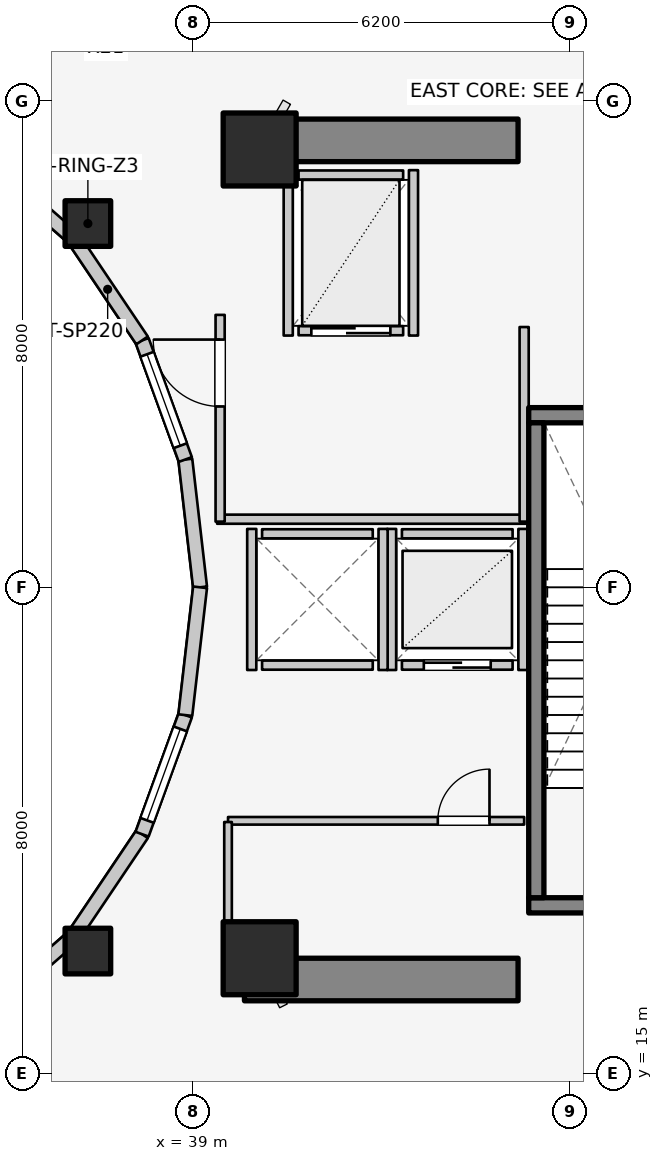
"""IFC4 building model, lengths in metres.
Left out: names, types, materials, properties, quantities, classifications, styles, units other than length and angle.
Written with IfcOpenShell. Run it as: python <this file> out.ifc"""

import sys

from ifc_helpers import new_model, si_unit, direction, frame, frame_2d, origin, origin_2d, place, context, subcontext, project, spatial, rectangle, extrude, element, fill, save


model = new_model("IFC4")
c1 = context("Model", 3, precision=1e-05, world=origin(), true_north=direction((0.0, 1.0)))
c2 = subcontext(c1, "Body", "Model", "MODEL_VIEW")
j1 = project(units=[si_unit("LENGTHUNIT", "METRE"), si_unit("PLANEANGLEUNIT", "RADIAN")], contexts=[c1])
p1 = place(None, origin())
s1 = spatial("IfcSite", under=j1, at=p1, CompositionType="ELEMENT")
p2 = place(p1, origin())
s2 = spatial("IfcBuilding", under=s1, at=p2, CompositionType="ELEMENT")
p3 = place(p2, frame((0.0, 0.0, 129.0)))
s3 = spatial("IfcBuildingStorey", under=s2, at=p3, CompositionType="ELEMENT", Elevation=129.0)
for number, where, z_axis, x_axis in (
    (1, (39.85, 16.55, 0.0), (0.0, 0.0, 1.0), (1.0, 0.0, 0.0)),
    (2, (39.85, 30.35, 0.0), (0.0, 0.0, 1.0), (1.0, 0.0, 0.0)),
):
    element("IfcWall", number, at=place(p3, frame(where, z_axis=z_axis, x_axis=x_axis)), inside=s3, PredefinedType="SHEAR", context=c2, shape_type="SweptSolid", body=[
        extrude(rectangle(XDim=4.5, YDim=0.7, at=frame_2d((2.25, 0.0))), origin(), (0.0, 0.0, 1.0), 4.2),
    ])
p4 = place(p3, frame((44.525, 17.77, 0.0), z_axis=(0.0, 0.0, 1.0), x_axis=(1.0, 0.0, 0.0)))
e3 = element("IfcWall", 3, at=p4, inside=s3, PredefinedType="SOLIDWALL", context=c2, shape_type="SweptSolid", body=[
    extrude(rectangle(XDim=3.37, YDim=0.25, at=frame_2d((1.685, 0.0))), origin(), (0.0, 0.0, 1.0), 4.2),
])
p5 = place(p4, frame((1.135, 0.0, 0.0)))
e4 = element("IfcOpeningElement", 4, at=p5, cuts=e3, PredefinedType="OPENING", context=c2, shape_type="SweptSolid", body=[
    extrude(rectangle(XDim=1.1, YDim=2.1, at=frame_2d((0.55, 1.05))), frame((0.0, 0.135, 0.0), z_axis=(0.0, -1.0, 0.0), x_axis=(1.0, 0.0, 0.0)), (0.0, 0.0, 1.0), 0.27),
])
p6 = place(p3, frame((44.525, 25.83, 0.0), z_axis=(0.0, 0.0, 1.0), x_axis=(1.0, 0.0, 0.0)))
e5 = element("IfcWall", 5, at=p6, inside=s3, PredefinedType="SOLIDWALL", context=c2, shape_type="SweptSolid", body=[
    extrude(rectangle(XDim=3.37, YDim=0.25, at=frame_2d((1.685, 0.0))), origin(), (0.0, 0.0, 1.0), 4.2),
])
p7 = place(p3, frame((44.65, 17.895, 0.0), z_axis=(0.0, 0.0, 1.0), x_axis=(0.0, 1.0, 0.0)))
e6 = element("IfcWall", 6, at=p7, inside=s3, PredefinedType="SOLIDWALL", context=c2, shape_type="SweptSolid", body=[
    extrude(rectangle(XDim=7.81, YDim=0.25, at=frame_2d((3.905, 0.0))), origin(), (0.0, 0.0, 1.0), 4.2),
])
for number, where, z_axis, x_axis in (
    (7, (40.1, 16.9, 0.0), (0.0, 0.0, 1.0), (1.0, 0.0, 0.0)),
    (8, (40.1, 30.2, 0.0), (0.0, 0.0, 1.0), (1.0, 0.0, 0.0)),
):
    element("IfcColumn", number, at=place(p3, frame(where, z_axis=z_axis, x_axis=x_axis)), inside=s3, PredefinedType="COLUMN", context=c2, shape_type="SweptSolid", body=[
        extrude(rectangle(XDim=1.2, YDim=1.2, at=origin_2d()), origin(), (0.0, 0.0, 1.0), 4.2),
    ])
for number, where, z_axis, x_axis in (
    (9, (37.275, 28.982, 0.0), (0.0, 0.0, 1.0), (1.0, 0.0, 0.0)),
    (10, (37.275, 17.018, 0.0), (0.0, 0.0, 1.0), (1.0, 0.0, 0.0)),
):
    element("IfcColumn", number, at=place(p3, frame(where, z_axis=z_axis, x_axis=x_axis)), inside=s3, PredefinedType="COLUMN", context=c2, shape_type="SweptSolid", body=[
        extrude(rectangle(XDim=0.75, YDim=0.75, at=origin_2d()), origin(), (0.0, 0.0, 1.0), 4.2),
    ])
p8 = place(p3, frame((39.12, 23.0, 0.0), z_axis=(0.0, 0.0, 1.0), x_axis=(-0.114711713601, 0.993398823617, 0.0)))
e11 = element("IfcWall", 11, at=p8, inside=s3, PredefinedType="STANDARD", context=c2, shape_type="SweptSolid", body=[
    extrude(rectangle(XDim=2.115, YDim=0.23, at=frame_2d((1.058, 0.0))), origin(), (0.0, 0.0, 1.0), 2.8),
])
p9 = place(p3, frame((38.877, 25.102, 0.0), z_axis=(0.0, 0.0, 1.0), x_axis=(-0.341423187295, 0.93990968033, 0.0)))
e12 = element("IfcWall", 12, at=p9, inside=s3, PredefinedType="STANDARD", context=c2, shape_type="SweptSolid", body=[
    extrude(rectangle(XDim=2.084, YDim=0.23, at=frame_2d((1.042, 0.0))), origin(), (0.0, 0.0, 1.0), 2.8),
])
p10 = place(p9, frame((0.242, 0.0, 0.85)))
e13 = element("IfcOpeningElement", 13, at=p10, cuts=e12, PredefinedType="OPENING", context=c2, shape_type="SweptSolid", body=[
    extrude(rectangle(XDim=1.6, YDim=1.65, at=frame_2d((0.8, 0.825))), frame((0.0, 0.125, 0.0), z_axis=(0.0, -1.0, 0.0), x_axis=(1.0, 0.0, 0.0)), (0.0, 0.0, 1.0), 0.25),
])
p11 = place(p3, frame((38.166, 27.06, 0.0), z_axis=(0.0, 0.0, 1.0), x_axis=(-0.558197800898, 0.829707909492, 0.0)))
e14 = element("IfcWall", 14, at=p11, inside=s3, PredefinedType="STANDARD", context=c2, shape_type="SweptSolid", body=[
    extrude(rectangle(XDim=2.027, YDim=0.23, at=frame_2d((1.013, 0.0))), origin(), (0.0, 0.0, 1.0), 2.32),
])
for number, where, z_axis, x_axis in (
    (15, (37.035, 28.742, 0.0), (0.0, 0.0, 1.0), (-0.753, 0.659, 0.0)),
    (16, (35.56, 15.968, 0.0), (0.0, 0.0, 1.0), (0.753, 0.659, 0.0)),
):
    element("IfcWall", number, at=place(p3, frame(where, z_axis=z_axis, x_axis=x_axis)), inside=s3, PredefinedType="STANDARD", context=c2, shape_type="SweptSolid", body=[
        extrude(rectangle(XDim=1.959, YDim=0.23, at=frame_2d((0.98, 0.0))), origin(), (0.0, 0.0, 1.0), 2.32),
    ])
p12 = place(p3, frame((37.035, 17.258, 0.0), z_axis=(0.0, 0.0, 1.0), x_axis=(0.558197800898, 0.829707909492, 0.0)))
e17 = element("IfcWall", 17, at=p12, inside=s3, PredefinedType="STANDARD", context=c2, shape_type="SweptSolid", body=[
    extrude(rectangle(XDim=2.027, YDim=0.23, at=frame_2d((1.013, 0.0))), origin(), (0.0, 0.0, 1.0), 2.32),
])
p13 = place(p3, frame((38.166, 18.94, 0.0), z_axis=(0.0, 0.0, 1.0), x_axis=(0.341423187295, 0.93990968033, 0.0)))
e18 = element("IfcWall", 18, at=p13, inside=s3, PredefinedType="STANDARD", context=c2, shape_type="SweptSolid", body=[
    extrude(rectangle(XDim=2.084, YDim=0.23, at=frame_2d((1.042, 0.0))), origin(), (0.0, 0.0, 1.0), 2.8),
])
p14 = place(p13, frame((0.242, 0.0, 0.85)))
e19 = element("IfcOpeningElement", 19, at=p14, cuts=e18, PredefinedType="OPENING", context=c2, shape_type="SweptSolid", body=[
    extrude(rectangle(XDim=1.6, YDim=1.65, at=frame_2d((0.8, 0.825))), frame((0.0, 0.125, 0.0), z_axis=(0.0, -1.0, 0.0), x_axis=(1.0, 0.0, 0.0)), (0.0, 0.0, 1.0), 0.25),
])
p15 = place(p3, frame((38.877, 20.898, 0.0), z_axis=(0.0, 0.0, 1.0), x_axis=(0.114711713601, 0.993398823617, 0.0)))
e20 = element("IfcWall", 20, at=p15, inside=s3, PredefinedType="STANDARD", context=c2, shape_type="SweptSolid", body=[
    extrude(rectangle(XDim=2.115, YDim=0.23, at=frame_2d((1.058, 0.0))), origin(), (0.0, 0.0, 1.0), 2.8),
])
p16 = place(p3, frame((42.44, 21.72, 0.0), z_axis=(0.0, 0.0, 1.0), x_axis=(1.0, 0.0, 0.0)))
e21 = element("IfcWall", 21, at=p16, inside=s3, PredefinedType="SOLIDWALL", context=c2, shape_type="SweptSolid", body=[
    extrude(rectangle(XDim=1.82, YDim=0.15, at=frame_2d((0.91, 0.0))), origin(), (0.0, 0.0, 1.0), 3.675),
])
p17 = place(p16, frame((0.36, 0.0, 0.0)))
e22 = element("IfcOpeningElement", 22, at=p17, cuts=e21, PredefinedType="OPENING", context=c2, shape_type="SweptSolid", body=[
    extrude(rectangle(XDim=1.1, YDim=2.1, at=frame_2d((0.55, 1.05))), frame((0.0, 0.085, 0.0), z_axis=(0.0, -1.0, 0.0), x_axis=(1.0, 0.0, 0.0)), (0.0, 0.0, 1.0), 0.17),
])
p18 = place(p3, frame((42.44, 23.88, 0.0), z_axis=(0.0, 0.0, 1.0), x_axis=(1.0, 0.0, 0.0)))
e23 = element("IfcWall", 23, at=p18, inside=s3, PredefinedType="SOLIDWALL", context=c2, shape_type="SweptSolid", body=[
    extrude(rectangle(XDim=1.82, YDim=0.15, at=frame_2d((0.91, 0.0))), origin(), (0.0, 0.0, 1.0), 3.675),
])
for number, where, z_axis, x_axis in (
    (24, (42.27, 21.64, 0.0), (0.0, 0.0, 1.0), (0.0, 1.0, 0.0)),
    (25, (44.43, 21.64, 0.0), (0.0, 0.0, 1.0), (0.0, 1.0, 0.0)),
):
    element("IfcWall", number, at=place(p3, frame(where, z_axis=z_axis, x_axis=x_axis)), inside=s3, PredefinedType="SOLIDWALL", context=c2, shape_type="SweptSolid", body=[
        extrude(rectangle(XDim=2.32, YDim=0.15, at=frame_2d((1.16, 0.0))), origin(), (0.0, 0.0, 1.0), 3.675),
    ])
for number, where, z_axis, x_axis in (
    (26, (40.14, 21.72, 0.0), (0.0, 0.0, 1.0), (1.0, 0.0, 0.0)),
    (27, (40.14, 23.88, 0.0), (0.0, 0.0, 1.0), (1.0, 0.0, 0.0)),
):
    element("IfcWall", number, at=place(p3, frame(where, z_axis=z_axis, x_axis=x_axis)), inside=s3, PredefinedType="SOLIDWALL", context=c2, shape_type="SweptSolid", body=[
        extrude(rectangle(XDim=1.82, YDim=0.15, at=frame_2d((0.91, 0.0))), origin(), (0.0, 0.0, 1.0), 3.22),
    ])
p19 = place(p3, frame((39.97, 21.64, 0.0), z_axis=(0.0, 0.0, 1.0), x_axis=(0.0, 1.0, 0.0)))
e28 = element("IfcWall", 28, at=p19, inside=s3, PredefinedType="SOLIDWALL", context=c2, shape_type="SweptSolid", body=[
    extrude(rectangle(XDim=2.32, YDim=0.15, at=frame_2d((1.16, 0.0))), origin(), (0.0, 0.0, 1.0), 3.22),
])
p20 = place(p3, frame((42.13, 21.64, 0.0), z_axis=(0.0, 0.0, 1.0), x_axis=(0.0, 1.0, 0.0)))
e29 = element("IfcWall", 29, at=p20, inside=s3, PredefinedType="SOLIDWALL", context=c2, shape_type="SweptSolid", body=[
    extrude(rectangle(XDim=2.32, YDim=0.15, at=frame_2d((1.16, 0.0))), origin(), (0.0, 0.0, 1.0), 3.675),
])
p21 = place(p3, frame((40.74, 27.22, 0.0), z_axis=(0.0, 0.0, 1.0), x_axis=(1.0, 0.0, 0.0)))
e30 = element("IfcWall", 30, at=p21, inside=s3, PredefinedType="SOLIDWALL", context=c2, shape_type="SweptSolid", body=[
    extrude(rectangle(XDim=1.72, YDim=0.15, at=frame_2d((0.86, 0.0))), origin(), (0.0, 0.0, 1.0), 3.675),
])
p22 = place(p21, frame((0.21, 0.0, 0.0)))
e31 = element("IfcOpeningElement", 31, at=p22, cuts=e30, PredefinedType="OPENING", context=c2, shape_type="SweptSolid", body=[
    extrude(rectangle(XDim=1.3, YDim=2.1, at=frame_2d((0.65, 1.05))), frame((0.0, 0.085, 0.0), z_axis=(0.0, -1.0, 0.0), x_axis=(1.0, 0.0, 0.0)), (0.0, 0.0, 1.0), 0.17),
])
p23 = place(p3, frame((40.74, 29.78, 0.0), z_axis=(0.0, 0.0, 1.0), x_axis=(1.0, 0.0, 0.0)))
e32 = element("IfcWall", 32, at=p23, inside=s3, PredefinedType="SOLIDWALL", context=c2, shape_type="SweptSolid", body=[
    extrude(rectangle(XDim=1.72, YDim=0.15, at=frame_2d((0.86, 0.0))), origin(), (0.0, 0.0, 1.0), 3.675),
])
for number, where, z_axis, x_axis in (
    (33, (40.57, 27.14, 0.0), (0.0, 0.0, 1.0), (0.0, 1.0, 0.0)),
    (34, (42.63, 27.14, 0.0), (0.0, 0.0, 1.0), (0.0, 1.0, 0.0)),
):
    element("IfcWall", number, at=place(p3, frame(where, z_axis=z_axis, x_axis=x_axis)), inside=s3, PredefinedType="SOLIDWALL", context=c2, shape_type="SweptSolid", body=[
        extrude(rectangle(XDim=2.72, YDim=0.15, at=frame_2d((1.36, 0.0))), origin(), (0.0, 0.0, 1.0), 3.675),
    ])
p24 = place(p3, frame((39.4, 24.12, 0.0), z_axis=(0.0, 0.0, 1.0), x_axis=(1.0, 0.0, 0.0)))
e35 = element("IfcWall", 35, at=p24, inside=s3, PredefinedType="PARTITIONING", context=c2, shape_type="SweptSolid", body=[
    extrude(rectangle(XDim=5.08, YDim=0.15, at=frame_2d((2.54, 0.0))), origin(), (0.0, 0.0, 1.0), 3.22),
])
p25 = place(p3, frame((44.45, 24.08, 0.0), z_axis=(0.0, 0.0, 1.0), x_axis=(0.0, 1.0, 0.0)))
e36 = element("IfcWall", 36, at=p25, inside=s3, PredefinedType="PARTITIONING", context=c2, shape_type="SweptSolid", body=[
    extrude(rectangle(XDim=3.2, YDim=0.15, at=frame_2d((1.6, 0.0))), origin(), (0.0, 0.0, 1.0), 3.675),
])
p26 = place(p3, frame((39.45, 24.08, 0.0), z_axis=(0.0, 0.0, 1.0), x_axis=(0.0, 1.0, 0.0)))
e37 = element("IfcWall", 37, at=p26, inside=s3, PredefinedType="PARTITIONING", context=c2, shape_type="SweptSolid", body=[
    extrude(rectangle(XDim=3.4, YDim=0.15, at=frame_2d((1.7, 0.0))), origin(), (0.0, 0.0, 1.0), 3.675),
])
p27 = place(p26, frame((1.894, 0.0, 0.0)))
e38 = element("IfcOpeningElement", 38, at=p27, cuts=e37, PredefinedType="OPENING", context=c2, shape_type="SweptSolid", body=[
    extrude(rectangle(XDim=1.1, YDim=2.1, at=frame_2d((0.55, 1.05))), frame((0.0, 0.085, 0.0), z_axis=(0.0, -1.0, 0.0), x_axis=(1.0, 0.0, 0.0)), (0.0, 0.0, 1.0), 0.17),
])
p28 = place(p3, frame((39.58, 19.16, 0.0), z_axis=(0.0, 0.0, 1.0), x_axis=(1.0, 0.0, 0.0)))
e39 = element("IfcWall", 39, at=p28, inside=s3, PredefinedType="PARTITIONING", context=c2, shape_type="SweptSolid", body=[
    extrude(rectangle(XDim=4.87, YDim=0.125, at=frame_2d((2.435, 0.0))), origin(), (0.0, 0.0, 1.0), 3.22),
])
p29 = place(p28, frame((3.45, 0.0, 0.0)))
e40 = element("IfcOpeningElement", 40, at=p29, cuts=e39, PredefinedType="OPENING", context=c2, shape_type="SweptSolid", body=[
    extrude(rectangle(XDim=0.85, YDim=2.05, at=frame_2d((0.425, 1.025))), frame((0.0, 0.073, 0.0), z_axis=(0.0, -1.0, 0.0), x_axis=(1.0, 0.0, 0.0)), (0.0, 0.0, 1.0), 0.145),
])
p30 = place(p3, frame((39.58, 17.1, 0.0), z_axis=(0.0, 0.0, 1.0), x_axis=(0.0, 1.0, 0.0)))
e41 = element("IfcWall", 41, at=p30, inside=s3, PredefinedType="PARTITIONING", context=c2, shape_type="SweptSolid", body=[
    extrude(rectangle(XDim=2.04, YDim=0.125, at=frame_2d((1.02, 0.0))), origin(), (0.0, 0.0, 1.0), 3.052),
])
p31 = place(p10, origin())
e42 = element("IfcWindow", 42, at=p31, inside=s3, PartitioningType="SINGLE_PANEL", PredefinedType="WINDOW", context=c2, shape_type="SweptSolid", body=[
    extrude(rectangle(XDim=1.6, YDim=1.65, at=frame_2d((0.8, 0.825))), frame((0.0, 0.03, 0.0), z_axis=(0.0, -1.0, 0.0), x_axis=(1.0, 0.0, 0.0)), (0.0, 0.0, 1.0), 0.06),
])
fill(e13, e42)
p32 = place(p14, origin())
e43 = element("IfcWindow", 43, at=p32, inside=s3, PartitioningType="SINGLE_PANEL", PredefinedType="WINDOW", context=c2, shape_type="SweptSolid", body=[
    extrude(rectangle(XDim=1.6, YDim=1.65, at=frame_2d((0.8, 0.825))), frame((0.0, 0.03, 0.0), z_axis=(0.0, -1.0, 0.0), x_axis=(1.0, 0.0, 0.0)), (0.0, 0.0, 1.0), 0.06),
])
fill(e19, e43)
p33 = place(p17, origin())
e44 = element("IfcDoor", 44, at=p33, inside=s3, OperationType="DOUBLE_DOOR_SLIDING", PredefinedType="DOOR", context=c2, shape_type="SweptSolid", body=[
    extrude(rectangle(XDim=1.1, YDim=2.1, at=frame_2d((0.55, 1.05))), frame((0.0, 0.025, 0.0), z_axis=(0.0, -1.0, 0.0), x_axis=(1.0, 0.0, 0.0)), (0.0, 0.0, 1.0), 0.05),
])
fill(e22, e44)
p34 = place(p22, origin())
e45 = element("IfcDoor", 45, at=p34, inside=s3, OperationType="DOUBLE_DOOR_SLIDING", PredefinedType="DOOR", context=c2, shape_type="SweptSolid", body=[
    extrude(rectangle(XDim=1.3, YDim=2.1, at=frame_2d((0.65, 1.05))), frame((0.0, 0.025, 0.0), z_axis=(0.0, -1.0, 0.0), x_axis=(1.0, 0.0, 0.0)), (0.0, 0.0, 1.0), 0.05),
])
fill(e31, e45)
p35 = place(p27, origin())
e46 = element("IfcDoor", 46, at=p35, inside=s3, OperationType="SINGLE_SWING_RIGHT", PredefinedType="DOOR", context=c2, shape_type="SweptSolid", body=[
    extrude(rectangle(XDim=1.1, YDim=2.1, at=frame_2d((0.55, 1.05))), frame((0.0, 0.025, 0.0), z_axis=(0.0, -1.0, 0.0), x_axis=(1.0, 0.0, 0.0)), (0.0, 0.0, 1.0), 0.05),
])
fill(e38, e46)
p36 = place(p29, origin())
e47 = element("IfcDoor", 47, at=p36, inside=s3, OperationType="SINGLE_SWING_RIGHT", PredefinedType="DOOR", context=c2, shape_type="SweptSolid", body=[
    extrude(rectangle(XDim=0.85, YDim=2.05, at=frame_2d((0.425, 1.025))), frame((0.0, 0.025, 0.0), z_axis=(0.0, -1.0, 0.0), x_axis=(1.0, 0.0, 0.0)), (0.0, 0.0, 1.0), 0.05),
])
fill(e40, e47)
save(model, sys.argv[1])
